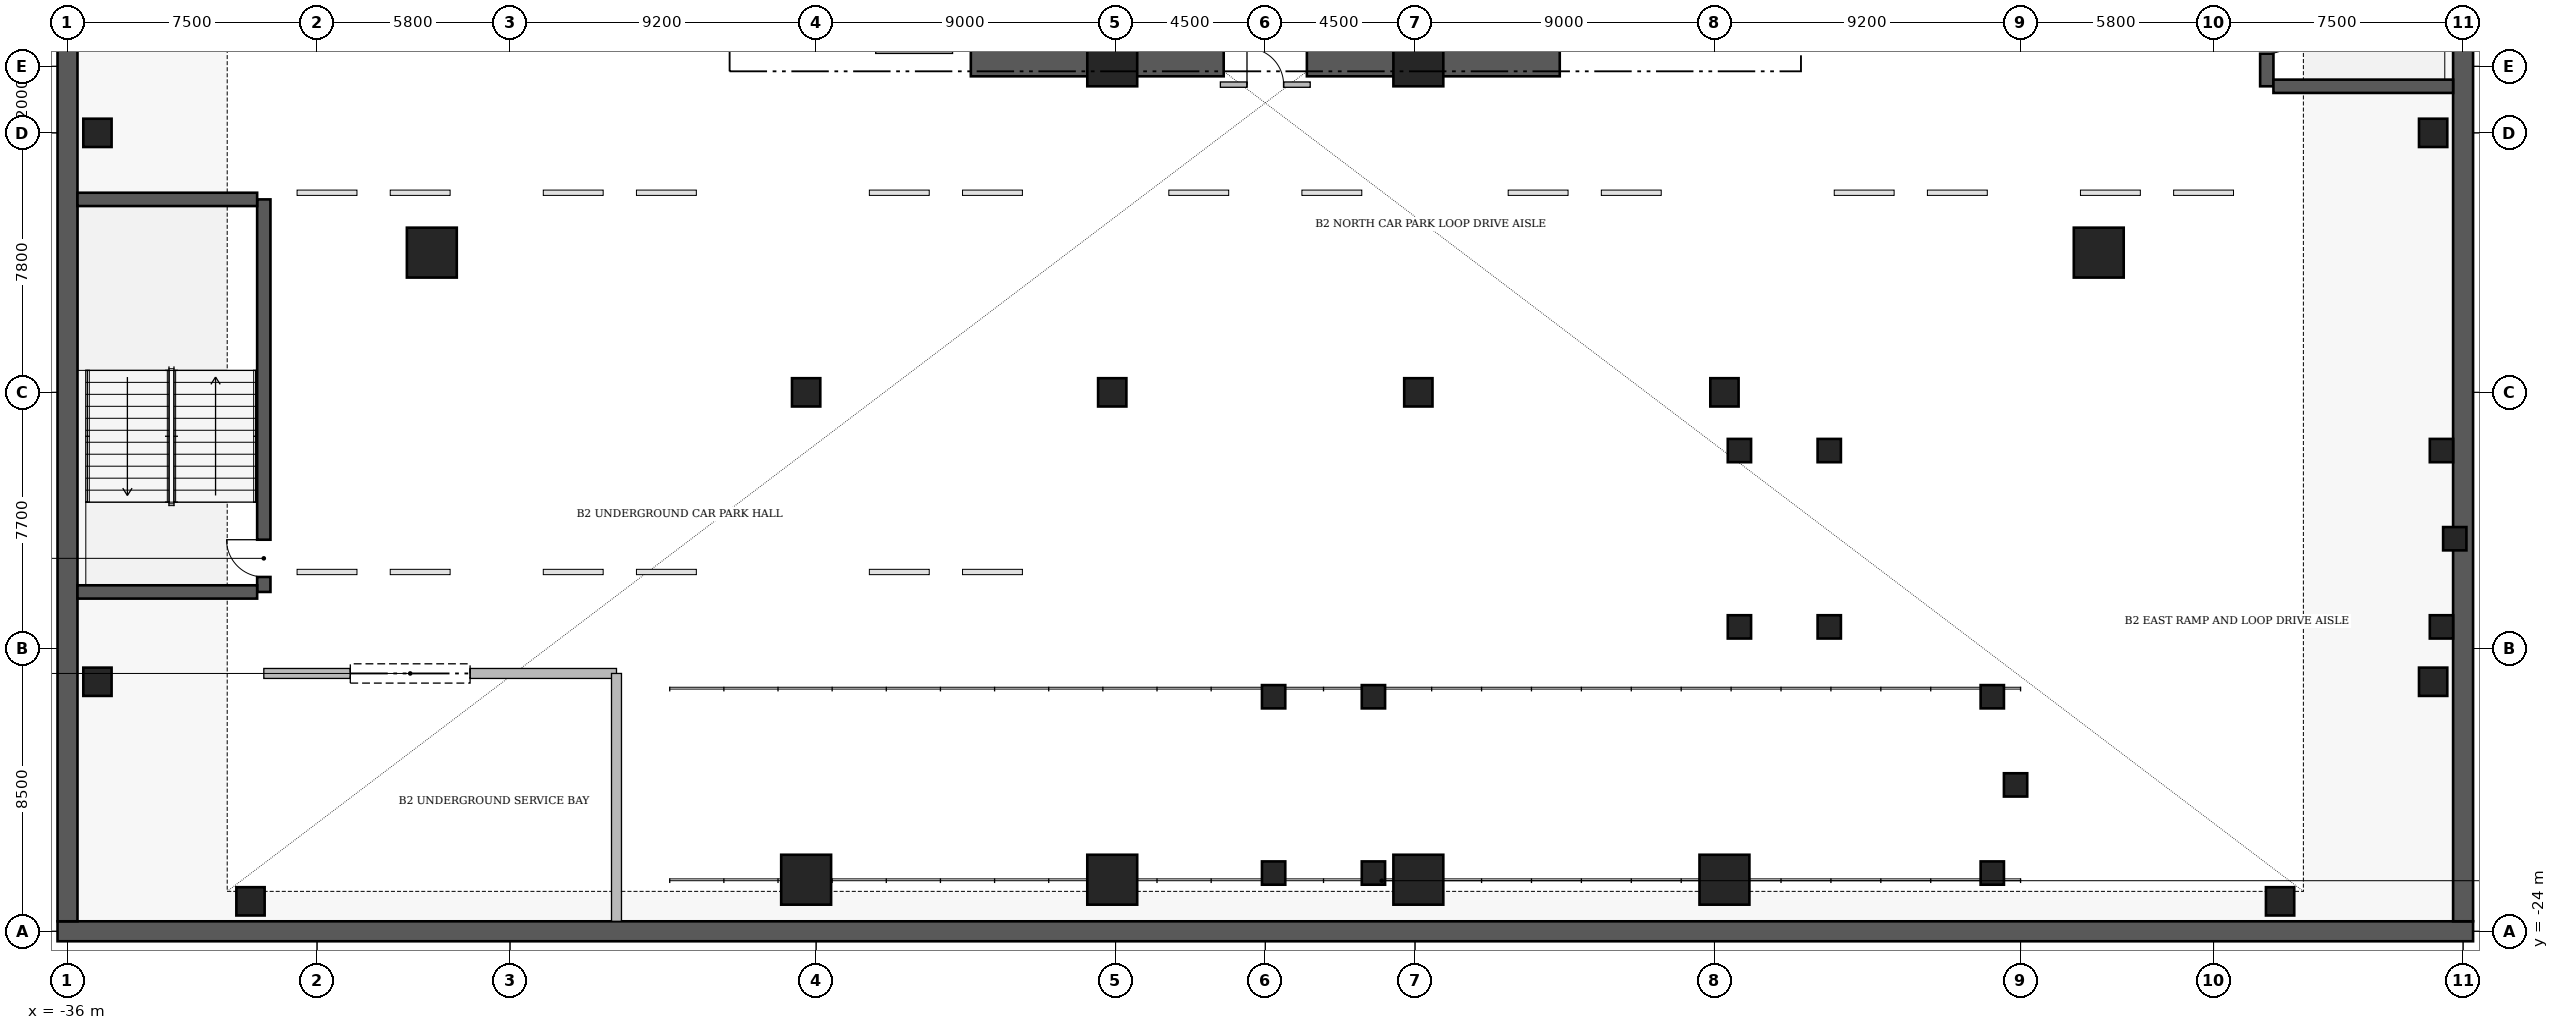
"""IFC4 building model, lengths in metres.
Left out: names, types, materials, properties, quantities, classifications, styles, units other than length and angle.
Written with IfcOpenShell. Run it as: python <this file> out.ifc"""

import sys

from ifc_helpers import new_model, si_unit, direction, frame, frame_2d, origin, origin_2d, place, context, subcontext, project, spatial, rectangle, extrude, element, fill, save


model = new_model("IFC4")
c1 = context("Model", 3, precision=1e-05, world=origin(), true_north=direction((0.0, 1.0)))
c2 = subcontext(c1, "Body", "Model", "MODEL_VIEW")
j1 = project(units=[si_unit("LENGTHUNIT", "METRE"), si_unit("PLANEANGLEUNIT", "RADIAN")], contexts=[c1])
p1 = place(None, origin())
s1 = spatial("IfcSite", under=j1, at=p1, CompositionType="ELEMENT")
p2 = place(p1, origin())
s2 = spatial("IfcBuilding", under=s1, at=p2, CompositionType="ELEMENT")
p3 = place(p2, frame((0.0, 0.0, -9.0)))
s3 = spatial("IfcBuildingStorey", under=s2, at=p3, CompositionType="ELEMENT", Elevation=-9.0)
p4 = place(p3, frame((36.3, -24.0, 0.0), z_axis=(0.0, 0.0, 1.0), x_axis=(-1.0, 0.0, 0.0)))
e1 = element("IfcWall", 1, at=p4, inside=s3, PredefinedType="USERDEFINED", context=c2, shape_type="SweptSolid", body=[
    extrude(rectangle(XDim=72.6, YDim=0.6, at=frame_2d((36.3, 0.0))), origin(), (0.0, 0.0, 1.0), 4.24),
])
for number, where, z_axis, x_axis in (
    (2, (-36.0, -23.7, 0.0), (0.0, 0.0, 1.0), (0.0, 1.0, 0.0)),
    (3, (36.0, 24.7, 0.0), (0.0, 0.0, 1.0), (0.0, -1.0, 0.0)),
):
    element("IfcWall", number, at=place(p3, frame(where, z_axis=z_axis, x_axis=x_axis)), inside=s3, PredefinedType="USERDEFINED", context=c2, shape_type="SweptSolid", body=[
        extrude(rectangle(XDim=48.4, YDim=0.6, at=frame_2d((24.2, 0.0))), origin(), (0.0, 0.0, 1.0), 4.24),
    ])
for number, where, z_axis, x_axis in (
    (4, (-8.85, 2.15, 0.0), (0.0, 0.0, 1.0), (1.0, 0.0, 0.0)),
    (5, (1.25, 2.15, 0.0), (0.0, 0.0, 1.0), (1.0, 0.0, 0.0)),
):
    element("IfcWall", number, at=place(p3, frame(where, z_axis=z_axis, x_axis=x_axis)), inside=s3, PredefinedType="SHEAR", context=c2, shape_type="SweptSolid", body=[
        extrude(rectangle(XDim=7.6, YDim=0.9, at=frame_2d((3.8, 0.0))), origin(), (0.0, 0.0, 1.0), 4.24),
    ])
p5 = place(p3, frame((-30.1, -13.8, 0.0), z_axis=(0.0, 0.0, 1.0), x_axis=(0.0, 1.0, 0.0)))
e6 = element("IfcWall", 6, at=p5, inside=s3, PredefinedType="SHEAR", context=c2, shape_type="SweptSolid", body=[
    extrude(rectangle(XDim=11.8, YDim=0.4, at=frame_2d((5.9, 0.0))), origin(), (0.0, 0.0, 1.0), 4.31),
])
p6 = place(p5, frame((0.45, 0.0, 0.0)))
e7 = element("IfcOpeningElement", 7, at=p6, cuts=e6, PredefinedType="OPENING", context=c2, shape_type="SweptSolid", body=[
    extrude(rectangle(XDim=1.12, YDim=2.22, at=frame_2d((0.56, 1.11))), frame((0.0, 0.21, 0.0), z_axis=(0.0, -1.0, 0.0), x_axis=(1.0, 0.0, 0.0)), (0.0, 0.0, 1.0), 0.42),
])
for number, where, z_axis, x_axis in (
    (8, (-35.7, -13.8, 0.0), (0.0, 0.0, 1.0), (1.0, 0.0, 0.0)),
    (9, (-35.7, -2.0, 0.0), (0.0, 0.0, 1.0), (1.0, 0.0, 0.0)),
):
    element("IfcWall", number, at=place(p3, frame(where, z_axis=z_axis, x_axis=x_axis)), inside=s3, PredefinedType="SHEAR", context=c2, shape_type="SweptSolid", body=[
        extrude(rectangle(XDim=5.4, YDim=0.4, at=frame_2d((2.7, 0.0))), origin(), (0.0, 0.0, 1.0), 4.31),
    ])
p7 = place(p3, frame((30.1, 13.2, 0.0), z_axis=(0.0, 0.0, 1.0), x_axis=(0.0, -1.0, 0.0)))
e10 = element("IfcWall", 10, at=p7, inside=s3, PredefinedType="SHEAR", context=c2, shape_type="SweptSolid", body=[
    extrude(rectangle(XDim=11.8, YDim=0.4, at=frame_2d((5.9, 0.0))), origin(), (0.0, 0.0, 1.0), 4.31),
])
p8 = place(p7, frame((9.7, 0.0, 0.0)))
e11 = element("IfcOpeningElement", 11, at=p8, cuts=e10, PredefinedType="OPENING", context=c2, shape_type="SweptSolid", body=[
    extrude(rectangle(XDim=1.12, YDim=2.22, at=frame_2d((0.56, 1.11))), frame((0.0, 0.21, 0.0), z_axis=(0.0, -1.0, 0.0), x_axis=(1.0, 0.0, 0.0)), (0.0, 0.0, 1.0), 0.42),
])
p9 = place(p3, frame((30.3, 1.4, 0.0), z_axis=(0.0, 0.0, 1.0), x_axis=(1.0, 0.0, 0.0)))
e12 = element("IfcWall", 12, at=p9, inside=s3, PredefinedType="SHEAR", context=c2, shape_type="SweptSolid", body=[
    extrude(rectangle(XDim=5.4, YDim=0.4, at=frame_2d((2.7, 0.0))), origin(), (0.0, 0.0, 1.0), 4.31),
])
for number, where, z_axis, x_axis in (
    (13, (-4.6, 2.15, 0.0), (0.0, 0.0, 1.0), (1.0, 0.0, 0.0)),
    (14, (4.6, 2.15, 0.0), (0.0, 0.0, 1.0), (1.0, 0.0, 0.0)),
    (15, (-13.8, -22.45, 0.0), (0.0, 0.0, 1.0), (1.0, 0.0, 0.0)),
    (16, (-4.6, -22.45, 0.0), (0.0, 0.0, 1.0), (1.0, 0.0, 0.0)),
    (17, (4.6, -22.45, 0.0), (0.0, 0.0, 1.0), (1.0, 0.0, 0.0)),
    (18, (13.8, -22.45, 0.0), (0.0, 0.0, 1.0), (1.0, 0.0, 0.0)),
    (19, (-25.05, -3.6, 0.0), (0.0, 0.0, 1.0), (1.0, 0.0, 0.0)),
    (20, (25.05, -3.6, 0.0), (0.0, 0.0, 1.0), (1.0, 0.0, 0.0)),
):
    element("IfcColumn", number, at=place(p3, frame(where, z_axis=z_axis, x_axis=x_axis)), inside=s3, PredefinedType="COLUMN", context=c2, shape_type="SweptSolid", body=[
        extrude(rectangle(XDim=1.5, YDim=1.5, at=origin_2d()), origin(), (0.0, 0.0, 1.0), 4.5),
    ])
for number, where, z_axis, x_axis in (
    (21, (-30.5, -23.1, 0.0), (0.0, 0.0, 1.0), (1.0, 0.0, 0.0)),
    (22, (30.5, -23.1, 0.0), (0.0, 0.0, 1.0), (1.0, 0.0, 0.0)),
    (23, (-35.1, -16.5, 0.0), (0.0, 0.0, 1.0), (1.0, 0.0, 0.0)),
    (24, (-35.1, 0.0, 0.0), (0.0, 0.0, 1.0), (1.0, 0.0, 0.0)),
    (25, (35.1, -16.5, 0.0), (0.0, 0.0, 1.0), (1.0, 0.0, 0.0)),
    (26, (35.1, 0.0, 0.0), (0.0, 0.0, 1.0), (1.0, 0.0, 0.0)),
    (27, (-13.8, -7.8, 0.0), (0.0, 0.0, 1.0), (1.0, 0.0, 0.0)),
    (28, (-4.6, -7.8, 0.0), (0.0, 0.0, 1.0), (1.0, 0.0, 0.0)),
    (29, (4.6, -7.8, 0.0), (0.0, 0.0, 1.0), (1.0, 0.0, 0.0)),
    (30, (13.8, -7.8, 0.0), (0.0, 0.0, 1.0), (1.0, 0.0, 0.0)),
):
    element("IfcColumn", number, at=place(p3, frame(where, z_axis=z_axis, x_axis=x_axis)), inside=s3, PredefinedType="COLUMN", context=c2, shape_type="SweptSolid", body=[
        extrude(rectangle(XDim=0.85, YDim=0.85, at=origin_2d()), origin(), (0.0, 0.0, 1.0), 4.5),
    ])
for number, where, z_axis, x_axis in (
    (31, (0.25, -22.25, 0.0), (0.0, 0.0, 1.0), (1.0, 0.0, 0.0)),
    (32, (3.25, -22.25, 0.0), (0.0, 0.0, 1.0), (1.0, 0.0, 0.0)),
    (33, (0.25, -16.95, 0.0), (0.0, 0.0, 1.0), (1.0, 0.0, 0.0)),
    (34, (3.25, -16.95, 0.0), (0.0, 0.0, 1.0), (1.0, 0.0, 0.0)),
):
    element("IfcColumn", number, at=place(p3, frame(where, z_axis=z_axis, x_axis=x_axis)), inside=s3, PredefinedType="COLUMN", context=c2, shape_type="SweptSolid", body=[
        extrude(rectangle(XDim=0.7, YDim=0.7, at=origin_2d()), origin(), (0.0, 0.0, 1.0), 1.97),
    ])
for number, where, z_axis, x_axis in (
    (35, (14.25, -14.85, 0.0), (0.0, 0.0, 1.0), (1.0, 0.0, 0.0)),
    (36, (16.95, -14.85, 0.0), (0.0, 0.0, 1.0), (1.0, 0.0, 0.0)),
    (37, (14.25, -9.55, 0.0), (0.0, 0.0, 1.0), (1.0, 0.0, 0.0)),
    (38, (16.95, -9.55, 0.0), (0.0, 0.0, 1.0), (1.0, 0.0, 0.0)),
):
    element("IfcColumn", number, at=place(p3, frame(where, z_axis=z_axis, x_axis=x_axis)), inside=s3, PredefinedType="COLUMN", context=c2, shape_type="SweptSolid", body=[
        extrude(rectangle(XDim=0.7, YDim=0.7, at=origin_2d()), origin(), (0.0, 0.0, 1.0), 4.5),
    ])
for number, where, z_axis, x_axis in (
    (39, (21.85, -22.25, 0.0), (0.0, 0.0, 1.0), (1.0, 0.0, 0.0)),
    (40, (22.55, -19.6, 0.0), (0.0, 0.0, 1.0), (1.0, 0.0, 0.0)),
    (41, (21.85, -16.95, 0.0), (0.0, 0.0, 1.0), (1.0, 0.0, 0.0)),
):
    element("IfcColumn", number, at=place(p3, frame(where, z_axis=z_axis, x_axis=x_axis)), inside=s3, PredefinedType="COLUMN", context=c2, shape_type="SweptSolid", body=[
        extrude(rectangle(XDim=0.7, YDim=0.7, at=origin_2d()), origin(), (0.0, 0.0, 1.0), 4.22),
    ])
for number, where, z_axis, x_axis in (
    (42, (35.35, -14.85, 0.0), (0.0, 0.0, 1.0), (1.0, 0.0, 0.0)),
    (43, (35.35, -9.55, 0.0), (0.0, 0.0, 1.0), (1.0, 0.0, 0.0)),
    (44, (35.75, -12.2, 0.0), (0.0, 0.0, 1.0), (1.0, 0.0, 0.0)),
):
    element("IfcColumn", number, at=place(p3, frame(where, z_axis=z_axis, x_axis=x_axis)), inside=s3, PredefinedType="COLUMN", context=c2, shape_type="SweptSolid", body=[
        extrude(rectangle(XDim=0.7, YDim=0.7, at=origin_2d()), origin(), (0.0, 0.0, 1.0), 4.5),
    ])
p10 = place(p3, frame((-30.1, -16.25, 0.0), z_axis=(0.0, 0.0, 1.0), x_axis=(1.0, 0.0, 0.0)))
e45 = element("IfcWall", 45, at=p10, inside=s3, PredefinedType="STANDARD", context=c2, shape_type="SweptSolid", body=[
    extrude(rectangle(XDim=10.6, YDim=0.3, at=frame_2d((5.3, 0.0))), origin(), (0.0, 0.0, 1.0), 4.24),
])
p11 = place(p10, frame((2.6, 0.0, 0.0)))
e46 = element("IfcOpeningElement", 46, at=p11, cuts=e45, PredefinedType="OPENING", context=c2, shape_type="SweptSolid", body=[
    extrude(rectangle(XDim=3.6, YDim=3.4, at=frame_2d((1.8, 1.7))), frame((0.0, 0.16, 0.0), z_axis=(0.0, -1.0, 0.0), x_axis=(1.0, 0.0, 0.0)), (0.0, 0.0, 1.0), 0.32),
])
p12 = place(p3, frame((-19.5, -23.7, 0.0), z_axis=(0.0, 0.0, 1.0), x_axis=(0.0, 1.0, 0.0)))
e47 = element("IfcWall", 47, at=p12, inside=s3, PredefinedType="STANDARD", context=c2, shape_type="SweptSolid", body=[
    extrude(rectangle(XDim=7.45, YDim=0.3, at=frame_2d((3.725, 0.0))), origin(), (0.0, 0.0, 1.0), 4.24),
])
p13 = place(p3, frame((-1.35, 1.45, 0.0), z_axis=(0.0, 0.0, 1.0), x_axis=(1.0, 0.0, 0.0)))
e48 = element("IfcWall", 48, at=p13, inside=s3, PredefinedType="PARTITIONING", context=c2, shape_type="SweptSolid", body=[
    extrude(rectangle(XDim=2.7, YDim=0.16, at=frame_2d((1.35, 0.0))), origin(), (0.0, 0.0, 1.0), 4.24),
])
p14 = place(p13, frame((0.8, 0.0, 0.0)))
e49 = element("IfcOpeningElement", 49, at=p14, cuts=e48, PredefinedType="OPENING", context=c2, shape_type="SweptSolid", body=[
    extrude(rectangle(XDim=1.1, YDim=2.2, at=frame_2d((0.55, 1.1))), frame((0.0, 0.09, 0.0), z_axis=(0.0, -1.0, 0.0), x_axis=(1.0, 0.0, 0.0)), (0.0, 0.0, 1.0), 0.18),
])
p15 = place(p3, frame((-11.71, 2.47, 0.0), z_axis=(0.0, 0.0, 1.0), x_axis=(1.0, 0.0, 0.0)))
e50 = element("IfcWall", 50, at=p15, inside=s3, PredefinedType="PARTITIONING", context=c2, shape_type="SweptSolid", body=[
    extrude(rectangle(XDim=2.31, YDim=0.165, at=frame_2d((1.155, 0.0))), origin(), (0.0, 0.0, 1.0), 2.84),
])
p16 = place(p11, origin())
e51 = element("IfcDoor", 51, at=p16, inside=s3, OperationType="ROLLINGUP", PredefinedType="GATE", context=c2, shape_type="SweptSolid", body=[
    extrude(rectangle(XDim=3.6, YDim=3.4, at=frame_2d((1.8, 1.7))), frame((0.0, 0.025, 0.0), z_axis=(0.0, -1.0, 0.0), x_axis=(1.0, 0.0, 0.0)), (0.0, 0.0, 1.0), 0.05),
])
fill(e46, e51)
p17 = place(p6, origin())
e52 = element("IfcDoor", 52, at=p17, inside=s3, OperationType="SINGLE_SWING_RIGHT", PredefinedType="DOOR", context=c2, shape_type="SweptSolid", body=[
    extrude(rectangle(XDim=1.12, YDim=2.22, at=frame_2d((0.56, 1.11))), frame((0.0, 0.025, 0.0), z_axis=(0.0, -1.0, 0.0), x_axis=(1.0, 0.0, 0.0)), (0.0, 0.0, 1.0), 0.05),
])
fill(e7, e52)
p18 = place(p8, origin())
e53 = element("IfcDoor", 53, at=p18, inside=s3, OperationType="SINGLE_SWING_LEFT", PredefinedType="DOOR", context=c2, shape_type="SweptSolid", body=[
    extrude(rectangle(XDim=1.12, YDim=2.22, at=frame_2d((0.56, 1.11))), frame((0.0, 0.025, 0.0), z_axis=(0.0, -1.0, 0.0), x_axis=(1.0, 0.0, 0.0)), (0.0, 0.0, 1.0), 0.05),
])
fill(e11, e53)
p19 = place(p14, origin())
e54 = element("IfcDoor", 54, at=p19, inside=s3, OperationType="SINGLE_SWING_LEFT", PredefinedType="DOOR", context=c2, shape_type="SweptSolid", body=[
    extrude(rectangle(XDim=1.1, YDim=2.2, at=frame_2d((0.55, 1.1))), frame((0.0, 0.025, 0.0), z_axis=(0.0, -1.0, 0.0), x_axis=(1.0, 0.0, 0.0)), (0.0, 0.0, 1.0), 0.05),
])
fill(e49, e54)
save(model, sys.argv[1])
